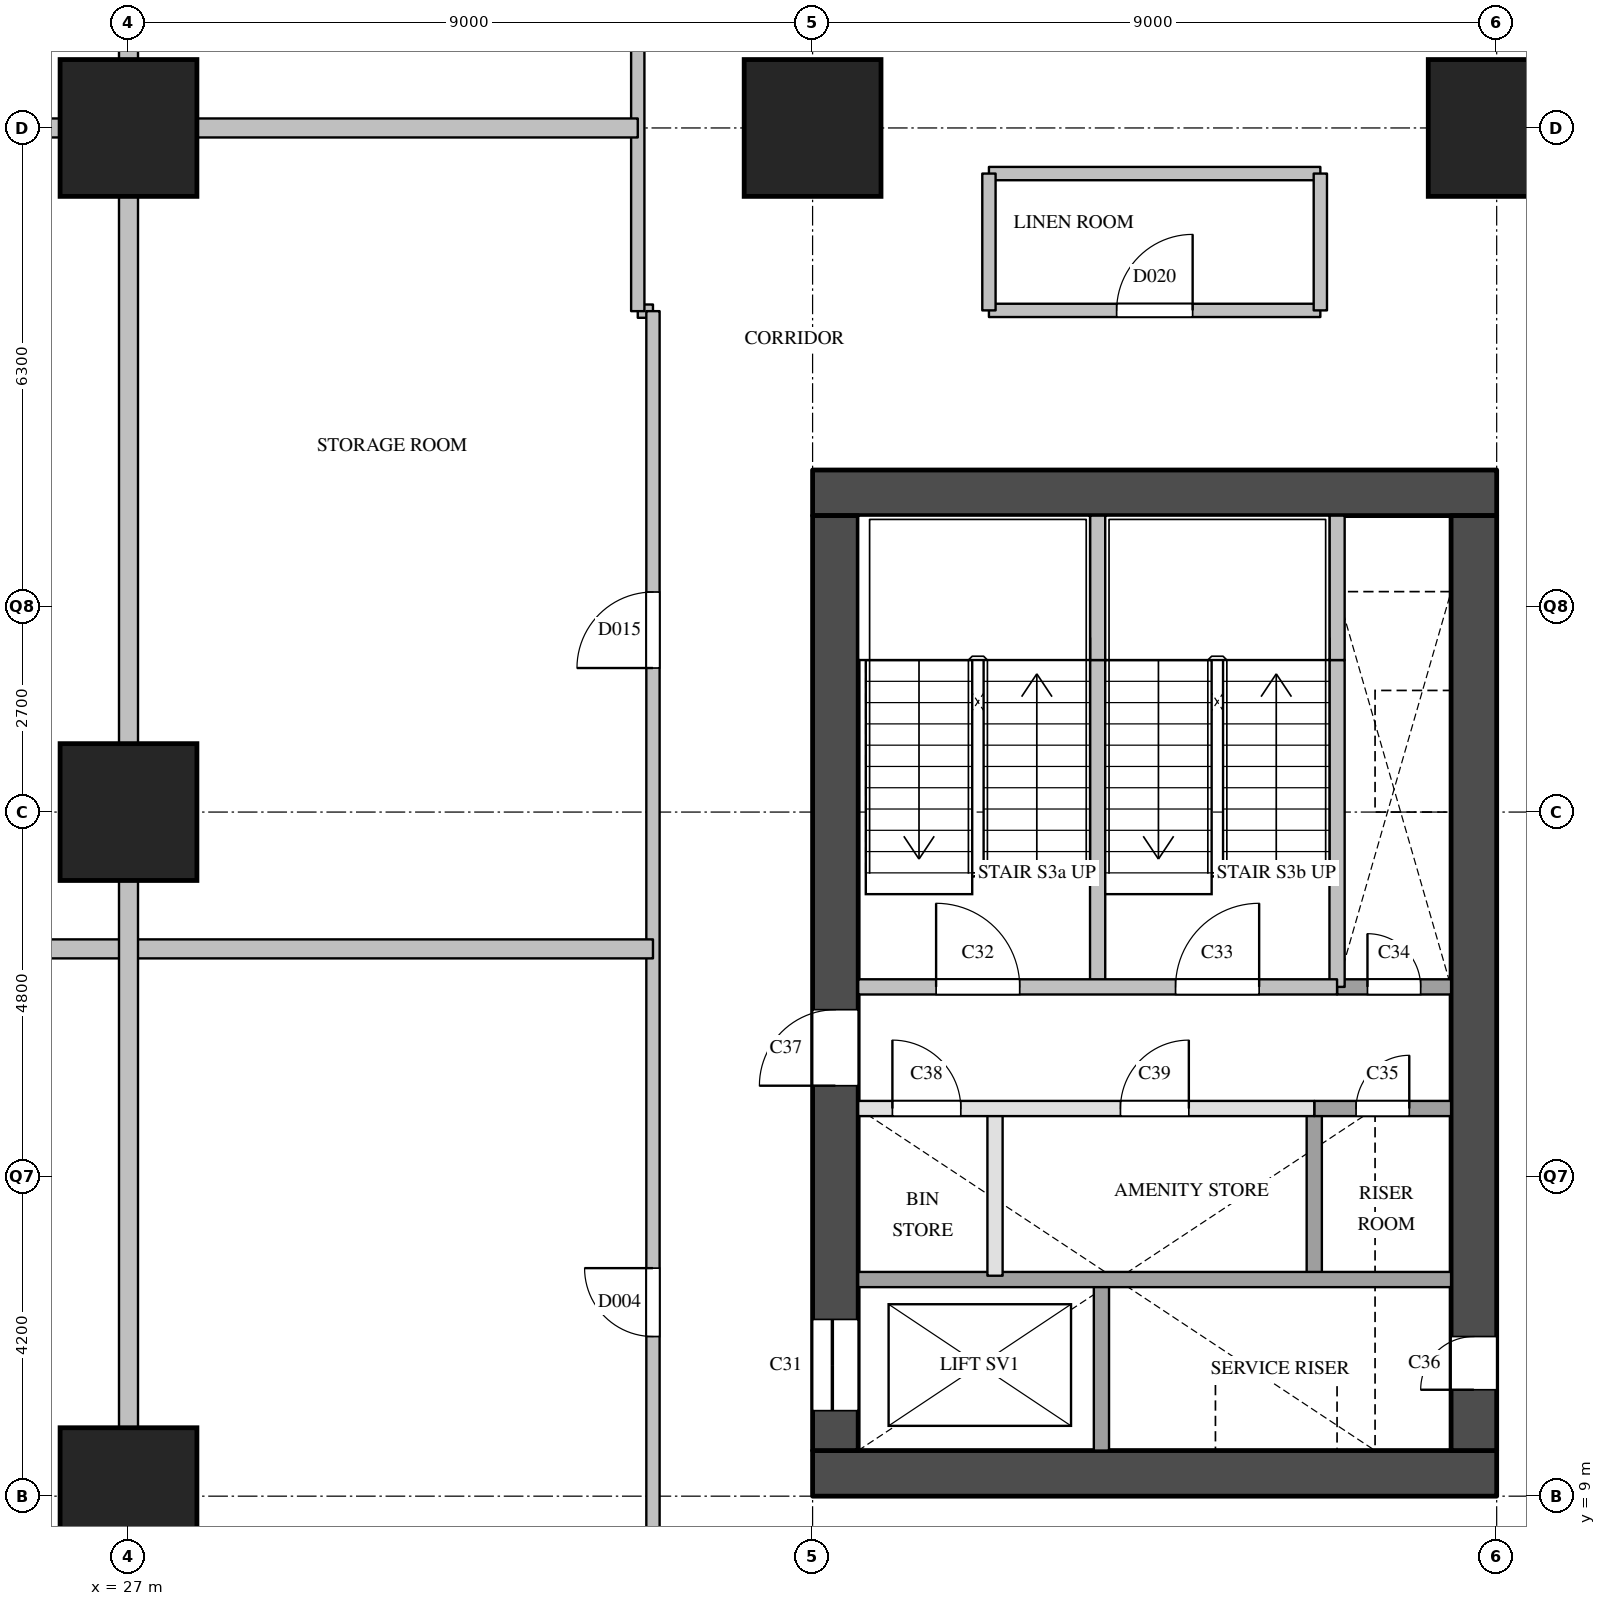
"""IFC4 building model, lengths in metres.
Left out: names, types, materials, properties, quantities, classifications, styles, units other than length and angle.
Written with IfcOpenShell. Run it as: python <this file> out.ifc"""

import sys

from ifc_helpers import new_model, si_unit, direction, frame, frame_2d, origin, origin_2d, place, context, subcontext, project, spatial, rectangle, extrude, element, fill, save


model = new_model("IFC4")
c1 = context("Model", 3, precision=1e-05, world=origin(), true_north=direction((0.0, 1.0)))
c2 = subcontext(c1, "Body", "Model", "MODEL_VIEW")
j1 = project(units=[si_unit("LENGTHUNIT", "METRE"), si_unit("PLANEANGLEUNIT", "RADIAN")], contexts=[c1])
p1 = place(None, origin())
s1 = spatial("IfcSite", under=j1, at=p1, CompositionType="ELEMENT")
p2 = place(p1, origin())
s2 = spatial("IfcBuilding", under=s1, at=p2, CompositionType="ELEMENT")
p3 = place(p2, frame((0.0, 0.0, 61.4)))
s3 = spatial("IfcBuildingStorey", under=s2, at=p3, CompositionType="ELEMENT", Elevation=61.4)
for number, where, z_axis, x_axis in (
    (1, (27.0, 9.0, 0.0), (0.0, 0.0, 1.0), (1.0, 0.0, 0.0)),
    (2, (27.0, 18.0, 0.0), (0.0, 0.0, 1.0), (1.0, 0.0, 0.0)),
    (3, (27.0, 27.0, 0.0), (0.0, 0.0, 1.0), (1.0, 0.0, 0.0)),
    (4, (36.0, 27.0, 0.0), (0.0, 0.0, 1.0), (1.0, 0.0, 0.0)),
    (5, (45.0, 27.0, 0.0), (0.0, 0.0, 1.0), (1.0, 0.0, 0.0)),
):
    element("IfcColumn", number, at=place(p3, frame(where, z_axis=z_axis, x_axis=x_axis)), inside=s3, PredefinedType="COLUMN", context=c2, shape_type="SweptSolid", body=[
        extrude(rectangle(XDim=1.8, YDim=1.8, at=origin_2d()), origin(), (0.0, 0.0, 1.0), 3.8),
    ])
for number, where, z_axis, x_axis in (
    (6, (36.0, 9.3, 0.0), (0.0, 0.0, 1.0), (1.0, 0.0, 0.0)),
    (7, (36.0, 22.2, 0.0), (0.0, 0.0, 1.0), (1.0, 0.0, 0.0)),
):
    element("IfcWall", number, at=place(p3, frame(where, z_axis=z_axis, x_axis=x_axis)), inside=s3, PredefinedType="SHEAR", context=c2, shape_type="SweptSolid", body=[
        extrude(rectangle(XDim=9.0, YDim=0.6, at=frame_2d((4.5, 0.0))), origin(), (0.0, 0.0, 1.0), 3.5),
    ])
p4 = place(p3, frame((36.3, 9.6, 0.0), z_axis=(0.0, 0.0, 1.0), x_axis=(0.0, 1.0, 0.0)))
e8 = element("IfcWall", 8, at=p4, inside=s3, PredefinedType="SHEAR", context=c2, shape_type="SweptSolid", body=[
    extrude(rectangle(XDim=12.3, YDim=0.6, at=frame_2d((6.15, 0.0))), origin(), (0.0, 0.0, 1.0), 3.5),
])
p5 = place(p4, frame((0.525, 0.0, 0.0)))
e9 = element("IfcOpeningElement", 9, at=p5, cuts=e8, PredefinedType="OPENING", context=c2, shape_type="SweptSolid", body=[
    extrude(rectangle(XDim=1.2, YDim=2.1, at=frame_2d((0.6, 1.05))), frame((0.0, 0.31, 0.0), z_axis=(0.0, -1.0, 0.0), x_axis=(1.0, 0.0, 0.0)), (0.0, 0.0, 1.0), 0.62),
])
p6 = place(p4, frame((4.8, 0.0, 0.0)))
e10 = element("IfcOpeningElement", 10, at=p6, cuts=e8, PredefinedType="OPENING", context=c2, shape_type="SweptSolid", body=[
    extrude(rectangle(XDim=1.0, YDim=2.1, at=frame_2d((0.5, 1.05))), frame((0.0, 0.31, 0.0), z_axis=(0.0, -1.0, 0.0), x_axis=(1.0, 0.0, 0.0)), (0.0, 0.0, 1.0), 0.62),
])
p7 = place(p3, frame((44.7, 9.6, 0.0), z_axis=(0.0, 0.0, 1.0), x_axis=(0.0, 1.0, 0.0)))
e11 = element("IfcWall", 11, at=p7, inside=s3, PredefinedType="SHEAR", context=c2, shape_type="SweptSolid", body=[
    extrude(rectangle(XDim=12.3, YDim=0.6, at=frame_2d((6.15, 0.0))), origin(), (0.0, 0.0, 1.0), 3.5),
])
p8 = place(p7, frame((0.8, 0.0, 0.0)))
e12 = element("IfcOpeningElement", 12, at=p8, cuts=e11, PredefinedType="OPENING", context=c2, shape_type="SweptSolid", body=[
    extrude(rectangle(XDim=0.7, YDim=2.1, at=frame_2d((0.35, 1.05))), frame((0.0, 0.31, 0.0), z_axis=(0.0, -1.0, 0.0), x_axis=(1.0, 0.0, 0.0)), (0.0, 0.0, 1.0), 0.62),
])
p9 = place(p3, frame((38.4, 11.9, 0.0), z_axis=(0.0, 0.0, 1.0), x_axis=(0.0, 1.0, 0.0)))
e13 = element("IfcWall", 13, at=p9, inside=s3, PredefinedType="PARTITIONING", context=c2, shape_type="SweptSolid", body=[
    extrude(rectangle(XDim=2.2, YDim=0.2, at=frame_2d((1.1, 0.0))), origin(), (0.0, 0.0, 1.0), 3.5),
])
p10 = place(p3, frame((39.75, 15.7, 0.0), z_axis=(0.0, 0.0, 1.0), x_axis=(0.0, 1.0, 0.0)))
e14 = element("IfcWall", 14, at=p10, inside=s3, PredefinedType="SOLIDWALL", context=c2, shape_type="SweptSolid", body=[
    extrude(rectangle(XDim=4.3, YDim=0.2, at=frame_2d((2.15, 0.0))), origin(), (0.0, 0.0, 1.0), 3.5),
])
p11 = place(p3, frame((39.75, 20.0, 0.0), z_axis=(0.0, 0.0, 1.0), x_axis=(0.0, 1.0, 0.0)))
e15 = element("IfcWall", 15, at=p11, inside=s3, PredefinedType="SOLIDWALL", context=c2, shape_type="SweptSolid", body=[
    extrude(rectangle(XDim=1.9, YDim=0.2, at=frame_2d((0.95, 0.0))), origin(), (0.0, 0.0, 1.0), 3.5),
])
p12 = place(p3, frame((39.8, 9.6, 0.0), z_axis=(0.0, 0.0, 1.0), x_axis=(0.0, 1.0, 0.0)))
e16 = element("IfcWall", 16, at=p12, inside=s3, PredefinedType="SOLIDWALL", context=c2, shape_type="SweptSolid", body=[
    extrude(rectangle(XDim=2.3, YDim=0.2, at=frame_2d((1.15, 0.0))), origin(), (0.0, 0.0, 1.0), 3.5),
])
p13 = place(p3, frame((42.6, 11.9, 0.0), z_axis=(0.0, 0.0, 1.0), x_axis=(0.0, 1.0, 0.0)))
e17 = element("IfcWall", 17, at=p13, inside=s3, PredefinedType="SOLIDWALL", context=c2, shape_type="SweptSolid", body=[
    extrude(rectangle(XDim=2.2, YDim=0.2, at=frame_2d((1.1, 0.0))), origin(), (0.0, 0.0, 1.0), 3.5),
])
p14 = place(p3, frame((42.9, 15.7, 0.0), z_axis=(0.0, 0.0, 1.0), x_axis=(0.0, 1.0, 0.0)))
e18 = element("IfcWall", 18, at=p14, inside=s3, PredefinedType="SOLIDWALL", context=c2, shape_type="SweptSolid", body=[
    extrude(rectangle(XDim=4.3, YDim=0.2, at=frame_2d((2.15, 0.0))), origin(), (0.0, 0.0, 1.0), 3.5),
])
p15 = place(p3, frame((42.9, 20.0, 0.0), z_axis=(0.0, 0.0, 1.0), x_axis=(0.0, 1.0, 0.0)))
e19 = element("IfcWall", 19, at=p15, inside=s3, PredefinedType="SOLIDWALL", context=c2, shape_type="SweptSolid", body=[
    extrude(rectangle(XDim=1.9, YDim=0.2, at=frame_2d((0.95, 0.0))), origin(), (0.0, 0.0, 1.0), 3.5),
])
p16 = place(p3, frame((36.6, 11.85, 0.0), z_axis=(0.0, 0.0, 1.0), x_axis=(1.0, 0.0, 0.0)))
e20 = element("IfcWall", 20, at=p16, inside=s3, PredefinedType="SOLIDWALL", context=c2, shape_type="SweptSolid", body=[
    extrude(rectangle(XDim=7.8, YDim=0.2, at=frame_2d((3.9, 0.0))), origin(), (0.0, 0.0, 1.0), 3.5),
])
p17 = place(p3, frame((36.6, 14.1, 0.0), z_axis=(0.0, 0.0, 1.0), x_axis=(1.0, 0.0, 0.0)))
e21 = element("IfcWall", 21, at=p17, inside=s3, PredefinedType="PARTITIONING", context=c2, shape_type="SweptSolid", body=[
    extrude(rectangle(XDim=6.0, YDim=0.2, at=frame_2d((3.0, 0.0))), origin(), (0.0, 0.0, 1.0), 3.5),
])
p18 = place(p17, frame((0.45, 0.0, 0.0)))
e22 = element("IfcOpeningElement", 22, at=p18, cuts=e21, PredefinedType="OPENING", context=c2, shape_type="SweptSolid", body=[
    extrude(rectangle(XDim=0.9, YDim=2.1, at=frame_2d((0.45, 1.05))), frame((0.0, 0.11, 0.0), z_axis=(0.0, -1.0, 0.0), x_axis=(1.0, 0.0, 0.0)), (0.0, 0.0, 1.0), 0.22),
])
p19 = place(p17, frame((3.45, 0.0, 0.0)))
e23 = element("IfcOpeningElement", 23, at=p19, cuts=e21, PredefinedType="OPENING", context=c2, shape_type="SweptSolid", body=[
    extrude(rectangle(XDim=0.9, YDim=2.1, at=frame_2d((0.45, 1.05))), frame((0.0, 0.11, 0.0), z_axis=(0.0, -1.0, 0.0), x_axis=(1.0, 0.0, 0.0)), (0.0, 0.0, 1.0), 0.22),
])
p20 = place(p3, frame((42.6, 14.1, 0.0), z_axis=(0.0, 0.0, 1.0), x_axis=(1.0, 0.0, 0.0)))
e24 = element("IfcWall", 24, at=p20, inside=s3, PredefinedType="SOLIDWALL", context=c2, shape_type="SweptSolid", body=[
    extrude(rectangle(XDim=1.8, YDim=0.2, at=frame_2d((0.9, 0.0))), origin(), (0.0, 0.0, 1.0), 3.5),
])
p21 = place(p20, frame((0.55, 0.0, 0.0)))
e25 = element("IfcOpeningElement", 25, at=p21, cuts=e24, PredefinedType="OPENING", context=c2, shape_type="SweptSolid", body=[
    extrude(rectangle(XDim=0.7, YDim=2.1, at=frame_2d((0.35, 1.05))), frame((0.0, 0.11, 0.0), z_axis=(0.0, -1.0, 0.0), x_axis=(1.0, 0.0, 0.0)), (0.0, 0.0, 1.0), 0.22),
])
p22 = place(p3, frame((42.9, 15.7, 0.0), z_axis=(0.0, 0.0, 1.0), x_axis=(1.0, 0.0, 0.0)))
e26 = element("IfcWall", 26, at=p22, inside=s3, PredefinedType="SOLIDWALL", context=c2, shape_type="SweptSolid", body=[
    extrude(rectangle(XDim=1.5, YDim=0.2, at=frame_2d((0.75, 0.0))), origin(), (0.0, 0.0, 1.0), 3.5),
])
p23 = place(p22, frame((0.4, 0.0, 0.0)))
e27 = element("IfcOpeningElement", 27, at=p23, cuts=e26, PredefinedType="OPENING", context=c2, shape_type="SweptSolid", body=[
    extrude(rectangle(XDim=0.7, YDim=2.1, at=frame_2d((0.35, 1.05))), frame((0.0, 0.11, 0.0), z_axis=(0.0, -1.0, 0.0), x_axis=(1.0, 0.0, 0.0)), (0.0, 0.0, 1.0), 0.22),
])
p24 = place(p3, frame((36.6, 15.7, 0.0), z_axis=(0.0, 0.0, 1.0), x_axis=(1.0, 0.0, 0.0)))
e28 = element("IfcWall", 28, at=p24, inside=s3, PredefinedType="SOLIDWALL", context=c2, shape_type="SweptSolid", body=[
    extrude(rectangle(XDim=6.3, YDim=0.2, at=frame_2d((3.15, 0.0))), origin(), (0.0, 0.0, 1.0), 3.5),
])
p25 = place(p24, frame((1.025, 0.0, 0.0)))
e29 = element("IfcOpeningElement", 29, at=p25, cuts=e28, PredefinedType="OPENING", context=c2, shape_type="SweptSolid", body=[
    extrude(rectangle(XDim=1.1, YDim=2.1, at=frame_2d((0.55, 1.05))), frame((0.0, 0.11, 0.0), z_axis=(0.0, -1.0, 0.0), x_axis=(1.0, 0.0, 0.0)), (0.0, 0.0, 1.0), 0.22),
])
p26 = place(p24, frame((4.175, 0.0, 0.0)))
e30 = element("IfcOpeningElement", 30, at=p26, cuts=e28, PredefinedType="OPENING", context=c2, shape_type="SweptSolid", body=[
    extrude(rectangle(XDim=1.1, YDim=2.1, at=frame_2d((0.55, 1.05))), frame((0.0, 0.11, 0.0), z_axis=(0.0, -1.0, 0.0), x_axis=(1.0, 0.0, 0.0)), (0.0, 0.0, 1.0), 0.22),
])
p27 = place(p3, frame((33.7, 24.59, 0.0), z_axis=(0.0, 0.0, 1.0), x_axis=(1.0, 0.0, 0.0)))
e31 = element("IfcWall", 31, at=p27, inside=s3, PredefinedType="PARTITIONING", context=c2, shape_type="SweptSolid", body=[
    extrude(rectangle(XDim=0.2, YDim=0.175, at=frame_2d((0.1, 0.0))), origin(), (0.0, 0.0, 1.0), 3.5),
])
p28 = place(p3, frame((38.32, 24.6, 0.0), z_axis=(0.0, 0.0, 1.0), x_axis=(1.0, 0.0, 0.0)))
e32 = element("IfcWall", 32, at=p28, inside=s3, PredefinedType="PARTITIONING", context=c2, shape_type="SweptSolid", body=[
    extrude(rectangle(XDim=4.36, YDim=0.175, at=frame_2d((2.18, 0.0))), origin(), (0.0, 0.0, 1.0), 3.5),
])
p29 = place(p28, frame((1.68, 0.0, 0.0)))
e33 = element("IfcOpeningElement", 33, at=p29, cuts=e32, PredefinedType="OPENING", context=c2, shape_type="SweptSolid", body=[
    extrude(rectangle(XDim=1.0, YDim=2.1, at=frame_2d((0.5, 1.05))), frame((0.0, 0.097, 0.0), z_axis=(0.0, -1.0, 0.0), x_axis=(1.0, 0.0, 0.0)), (0.0, 0.0, 1.0), 0.195),
])
p30 = place(p3, frame((38.32, 26.4, 0.0), z_axis=(0.0, 0.0, 1.0), x_axis=(1.0, 0.0, 0.0)))
e34 = element("IfcWall", 34, at=p30, inside=s3, PredefinedType="PARTITIONING", context=c2, shape_type="SweptSolid", body=[
    extrude(rectangle(XDim=4.36, YDim=0.175, at=frame_2d((2.18, 0.0))), origin(), (0.0, 0.0, 1.0), 3.5),
])
p31 = place(p3, frame((33.7, 24.59, 0.0), z_axis=(0.0, 0.0, 1.0), x_axis=(0.0, 1.0, 0.0)))
e35 = element("IfcWall", 35, at=p31, inside=s3, PredefinedType="PARTITIONING", context=c2, shape_type="SweptSolid", body=[
    extrude(rectangle(XDim=3.93, YDim=0.175, at=frame_2d((1.965, 0.0))), origin(), (0.0, 0.0, 1.0), 2.5),
])
p32 = place(p3, frame((33.9, 6.9, 0.0), z_axis=(0.0, 0.0, 1.0), x_axis=(0.0, 1.0, 0.0)))
e36 = element("IfcWall", 36, at=p32, inside=s3, PredefinedType="PARTITIONING", context=c2, shape_type="SweptSolid", body=[
    extrude(rectangle(XDim=17.69, YDim=0.175, at=frame_2d((8.845, 0.0))), origin(), (0.0, 0.0, 1.0), 3.5),
])
p33 = place(p32, frame((4.2, 0.0, 0.0)))
e37 = element("IfcOpeningElement", 37, at=p33, cuts=e36, PredefinedType="OPENING", context=c2, shape_type="SweptSolid", body=[
    extrude(rectangle(XDim=0.9, YDim=2.1, at=frame_2d((0.45, 1.05))), frame((0.0, 0.097, 0.0), z_axis=(0.0, -1.0, 0.0), x_axis=(1.0, 0.0, 0.0)), (0.0, 0.0, 1.0), 0.195),
])
p34 = place(p32, frame((12.995, 0.0, 0.0)))
e38 = element("IfcOpeningElement", 38, at=p34, cuts=e36, PredefinedType="OPENING", context=c2, shape_type="SweptSolid", body=[
    extrude(rectangle(XDim=1.0, YDim=2.1, at=frame_2d((0.5, 1.05))), frame((0.0, 0.097, 0.0), z_axis=(0.0, -1.0, 0.0), x_axis=(1.0, 0.0, 0.0)), (0.0, 0.0, 1.0), 0.195),
])
for number, where, z_axis, x_axis in (
    (39, (38.32, 24.6, 0.0), (0.0, 0.0, 1.0), (0.0, 1.0, 0.0)),
    (40, (42.68, 24.6, 0.0), (0.0, 0.0, 1.0), (0.0, 1.0, 0.0)),
):
    element("IfcWall", number, at=place(p3, frame(where, z_axis=z_axis, x_axis=x_axis)), inside=s3, PredefinedType="PARTITIONING", context=c2, shape_type="SweptSolid", body=[
        extrude(rectangle(XDim=1.8, YDim=0.175, at=frame_2d((0.9, 0.0))), origin(), (0.0, 0.0, 1.0), 3.5),
    ])
p35 = place(p3, frame((20.1, 16.2, 0.0), z_axis=(0.0, 0.0, 1.0), x_axis=(1.0, 0.0, 0.0)))
e41 = element("IfcWall", 41, at=p35, inside=s3, PredefinedType="PARTITIONING", context=c2, shape_type="SweptSolid", body=[
    extrude(rectangle(XDim=13.8, YDim=0.25, at=frame_2d((6.9, 0.0))), origin(), (0.0, 0.0, 1.0), 2.5),
])
p36 = place(p3, frame((20.3, 27.0, 0.0), z_axis=(0.0, 0.0, 1.0), x_axis=(1.0, 0.0, 0.0)))
e42 = element("IfcWall", 42, at=p36, inside=s3, PredefinedType="PARTITIONING", context=c2, shape_type="SweptSolid", body=[
    extrude(rectangle(XDim=13.4, YDim=0.25, at=frame_2d((6.7, 0.0))), origin(), (0.0, 0.0, 1.0), 2.5),
])
p37 = place(p3, frame((27.0, 0.0, 0.0), z_axis=(0.0, 0.0, 1.0), x_axis=(0.0, 1.0, 0.0)))
e43 = element("IfcWall", 43, at=p37, inside=s3, PredefinedType="PARTITIONING", context=c2, shape_type="SweptSolid", body=[
    extrude(rectangle(XDim=54.0, YDim=0.25, at=frame_2d((27.0, 0.0))), origin(), (0.0, 0.0, 1.0), 2.5),
])
p38 = place(p5, origin())
e44 = element("IfcDoor", 44, at=p38, inside=s3, OperationType="SLIDING_TO_LEFT", PredefinedType="DOOR", context=c2, shape_type="SweptSolid", body=[
    extrude(rectangle(XDim=1.2, YDim=2.1, at=frame_2d((0.6, 1.05))), frame((0.0, 0.025, 0.0), z_axis=(0.0, -1.0, 0.0), x_axis=(1.0, 0.0, 0.0)), (0.0, 0.0, 1.0), 0.05),
])
fill(e9, e44)
p39 = place(p25, origin())
e45 = element("IfcDoor", 45, at=p39, inside=s3, OperationType="SINGLE_SWING_LEFT", PredefinedType="DOOR", context=c2, shape_type="SweptSolid", body=[
    extrude(rectangle(XDim=1.1, YDim=2.1, at=frame_2d((0.55, 1.05))), frame((0.0, 0.025, 0.0), z_axis=(0.0, -1.0, 0.0), x_axis=(1.0, 0.0, 0.0)), (0.0, 0.0, 1.0), 0.05),
])
fill(e29, e45)
p40 = place(p26, origin())
e46 = element("IfcDoor", 46, at=p40, inside=s3, OperationType="SINGLE_SWING_RIGHT", PredefinedType="DOOR", context=c2, shape_type="SweptSolid", body=[
    extrude(rectangle(XDim=1.1, YDim=2.1, at=frame_2d((0.55, 1.05))), frame((0.0, 0.025, 0.0), z_axis=(0.0, -1.0, 0.0), x_axis=(1.0, 0.0, 0.0)), (0.0, 0.0, 1.0), 0.05),
])
fill(e30, e46)
p41 = place(p23, origin())
e47 = element("IfcDoor", 47, at=p41, inside=s3, OperationType="SINGLE_SWING_LEFT", PredefinedType="DOOR", context=c2, shape_type="SweptSolid", body=[
    extrude(rectangle(XDim=0.7, YDim=2.1, at=frame_2d((0.35, 1.05))), frame((0.0, 0.025, 0.0), z_axis=(0.0, -1.0, 0.0), x_axis=(1.0, 0.0, 0.0)), (0.0, 0.0, 1.0), 0.05),
])
fill(e27, e47)
p42 = place(p21, origin())
e48 = element("IfcDoor", 48, at=p42, inside=s3, OperationType="SINGLE_SWING_RIGHT", PredefinedType="DOOR", context=c2, shape_type="SweptSolid", body=[
    extrude(rectangle(XDim=0.7, YDim=2.1, at=frame_2d((0.35, 1.05))), frame((0.0, 0.025, 0.0), z_axis=(0.0, -1.0, 0.0), x_axis=(1.0, 0.0, 0.0)), (0.0, 0.0, 1.0), 0.05),
])
fill(e25, e48)
p43 = place(p8, origin())
e49 = element("IfcDoor", 49, at=p43, inside=s3, OperationType="SINGLE_SWING_LEFT", PredefinedType="DOOR", context=c2, shape_type="SweptSolid", body=[
    extrude(rectangle(XDim=0.7, YDim=2.1, at=frame_2d((0.35, 1.05))), frame((0.0, 0.025, 0.0), z_axis=(0.0, -1.0, 0.0), x_axis=(1.0, 0.0, 0.0)), (0.0, 0.0, 1.0), 0.05),
])
fill(e12, e49)
p44 = place(p6, origin())
e50 = element("IfcDoor", 50, at=p44, inside=s3, OperationType="SINGLE_SWING_LEFT", PredefinedType="DOOR", context=c2, shape_type="SweptSolid", body=[
    extrude(rectangle(XDim=1.0, YDim=2.1, at=frame_2d((0.5, 1.05))), frame((0.0, 0.025, 0.0), z_axis=(0.0, -1.0, 0.0), x_axis=(1.0, 0.0, 0.0)), (0.0, 0.0, 1.0), 0.05),
])
fill(e10, e50)
p45 = place(p18, origin())
e51 = element("IfcDoor", 51, at=p45, inside=s3, OperationType="SINGLE_SWING_LEFT", PredefinedType="DOOR", context=c2, shape_type="SweptSolid", body=[
    extrude(rectangle(XDim=0.9, YDim=2.1, at=frame_2d((0.45, 1.05))), frame((0.0, 0.025, 0.0), z_axis=(0.0, -1.0, 0.0), x_axis=(1.0, 0.0, 0.0)), (0.0, 0.0, 1.0), 0.05),
])
fill(e22, e51)
p46 = place(p19, origin())
e52 = element("IfcDoor", 52, at=p46, inside=s3, OperationType="SINGLE_SWING_RIGHT", PredefinedType="DOOR", context=c2, shape_type="SweptSolid", body=[
    extrude(rectangle(XDim=0.9, YDim=2.1, at=frame_2d((0.45, 1.05))), frame((0.0, 0.025, 0.0), z_axis=(0.0, -1.0, 0.0), x_axis=(1.0, 0.0, 0.0)), (0.0, 0.0, 1.0), 0.05),
])
fill(e23, e52)
p47 = place(p33, origin())
e53 = element("IfcDoor", 53, at=p47, inside=s3, OperationType="SINGLE_SWING_RIGHT", PredefinedType="DOOR", context=c2, shape_type="SweptSolid", body=[
    extrude(rectangle(XDim=0.9, YDim=2.1, at=frame_2d((0.45, 1.05))), frame((0.0, 0.025, 0.0), z_axis=(0.0, -1.0, 0.0), x_axis=(1.0, 0.0, 0.0)), (0.0, 0.0, 1.0), 0.05),
])
fill(e37, e53)
p48 = place(p34, origin())
e54 = element("IfcDoor", 54, at=p48, inside=s3, OperationType="SINGLE_SWING_LEFT", PredefinedType="DOOR", context=c2, shape_type="SweptSolid", body=[
    extrude(rectangle(XDim=1.0, YDim=2.1, at=frame_2d((0.5, 1.05))), frame((0.0, 0.025, 0.0), z_axis=(0.0, -1.0, 0.0), x_axis=(1.0, 0.0, 0.0)), (0.0, 0.0, 1.0), 0.05),
])
fill(e38, e54)
p49 = place(p29, origin())
e55 = element("IfcDoor", 55, at=p49, inside=s3, OperationType="SINGLE_SWING_RIGHT", PredefinedType="DOOR", context=c2, shape_type="SweptSolid", body=[
    extrude(rectangle(XDim=1.0, YDim=2.1, at=frame_2d((0.5, 1.05))), frame((0.0, 0.025, 0.0), z_axis=(0.0, -1.0, 0.0), x_axis=(1.0, 0.0, 0.0)), (0.0, 0.0, 1.0), 0.05),
])
fill(e33, e55)
save(model, sys.argv[1])
